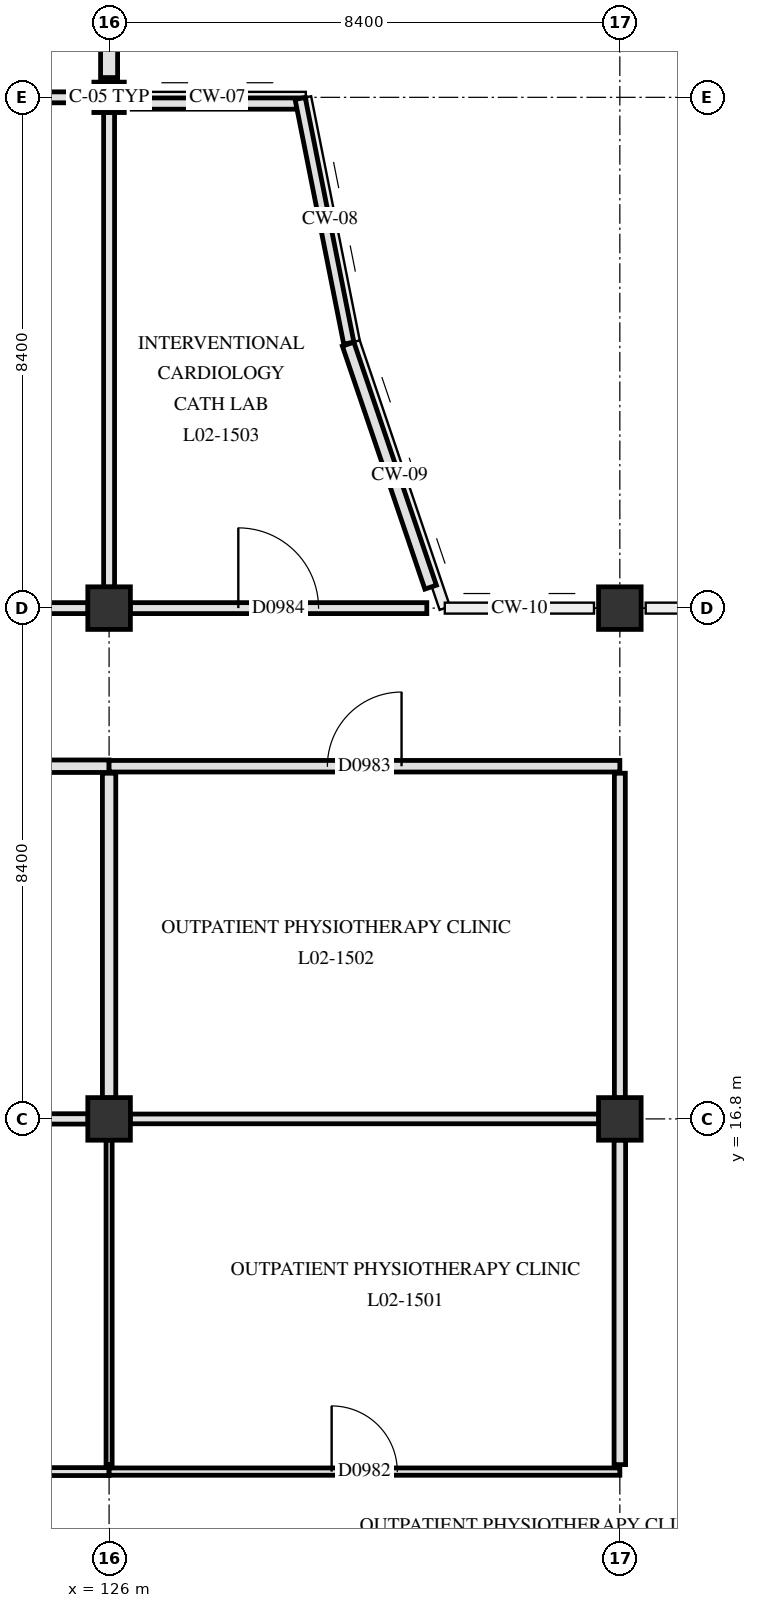
"""IFC4 building model, lengths in metres.
Left out: names, types, materials, properties, quantities, classifications, styles, units other than length and angle.
Written with IfcOpenShell. Run it as: python <this file> out.ifc"""

import sys

from ifc_helpers import new_model, si_unit, direction, frame, frame_2d, origin, origin_2d, place, context, subcontext, project, spatial, rectangle, extrude, element, fill, save


model = new_model("IFC4")
c1 = context("Model", 3, precision=1e-05, world=origin(), true_north=direction((0.0, 1.0)))
c2 = subcontext(c1, "Body", "Model", "MODEL_VIEW")
j1 = project(units=[si_unit("LENGTHUNIT", "METRE"), si_unit("PLANEANGLEUNIT", "RADIAN")], contexts=[c1])
p1 = place(None, origin())
s1 = spatial("IfcSite", under=j1, at=p1, CompositionType="ELEMENT")
p2 = place(p1, origin())
s2 = spatial("IfcBuilding", under=s1, at=p2, CompositionType="ELEMENT")
p3 = place(p2, frame((0.0, 0.0, 9.3)))
s3 = spatial("IfcBuildingStorey", under=s2, at=p3, CompositionType="ELEMENT", Elevation=9.3)
for number, where, z_axis, x_axis in (
    (1, (126.0, 16.8, 0.0), (0.0, 0.0, 1.0), (1.0, 0.0, 0.0)),
    (2, (126.0, 25.2, 0.0), (0.0, 0.0, 1.0), (1.0, 0.0, 0.0)),
):
    element("IfcColumn", number, at=place(p3, frame(where, z_axis=z_axis, x_axis=x_axis)), inside=s3, PredefinedType="COLUMN", context=c2, shape_type="SweptSolid", body=[
        extrude(rectangle(XDim=0.7, YDim=0.7, at=origin_2d()), origin(), (0.0, 0.0, 1.0), 5.1),
    ])
p4 = place(p3, frame((126.0, 33.6, 0.0), z_axis=(0.0, 0.0, 1.0), x_axis=(1.0, 0.0, 0.0)))
e3 = element("IfcColumn", 3, at=p4, inside=s3, PredefinedType="COLUMN", context=c2, shape_type="SweptSolid", body=[
    extrude(rectangle(XDim=0.5, YDim=0.5, at=origin_2d()), origin(), (0.0, 0.0, 1.0), 5.1),
])
for number, where, z_axis, x_axis in (
    (4, (134.4, 16.8, 0.0), (0.0, 0.0, 1.0), (1.0, 0.0, 0.0)),
    (5, (134.4, 25.2, 0.0), (0.0, 0.0, 1.0), (1.0, 0.0, 0.0)),
):
    element("IfcColumn", number, at=place(p3, frame(where, z_axis=z_axis, x_axis=x_axis)), inside=s3, PredefinedType="COLUMN", context=c2, shape_type="SweptSolid", body=[
        extrude(rectangle(XDim=0.7, YDim=0.7, at=origin_2d()), origin(), (0.0, 0.0, 1.0), 5.1),
    ])
p5 = place(p3, frame((126.0, 41.675, 0.0), z_axis=(0.0, 0.0, 1.0), x_axis=(0.0, -1.0, 0.0)))
e6 = element("IfcWall", 6, at=p5, inside=s3, PredefinedType="SOLIDWALL", context=c2, shape_type="SweptSolid", body=[
    extrude(rectangle(XDim=7.75, YDim=0.28, at=frame_2d((3.875, 0.0))), origin(), (0.0, 0.0, 1.0), 4.07),
])
p6 = place(p5, frame((0.988, 0.0, 0.85)))
e7 = element("IfcOpeningElement", 7, at=p6, cuts=e6, PredefinedType="OPENING", context=c2, shape_type="SweptSolid", body=[
    extrude(rectangle(XDim=1.9, YDim=1.42, at=frame_2d((0.95, 0.71))), frame((0.0, 0.15, 0.0), z_axis=(0.0, -1.0, 0.0), x_axis=(1.0, 0.0, 0.0)), (0.0, 0.0, 1.0), 0.3),
])
p7 = place(p5, frame((5.288, 0.0, 0.85)))
e8 = element("IfcOpeningElement", 8, at=p7, cuts=e6, PredefinedType="OPENING", context=c2, shape_type="SweptSolid", body=[
    extrude(rectangle(XDim=1.05, YDim=1.54, at=frame_2d((0.525, 0.77))), frame((0.0, 0.15, 0.0), z_axis=(0.0, -1.0, 0.0), x_axis=(1.0, 0.0, 0.0)), (0.0, 0.0, 1.0), 0.3),
])
p8 = place(p3, frame((126.38, 33.498, 5.08), z_axis=(0.0, 0.0, 1.0), x_axis=(1.0, 0.0, 0.0)))
e9 = element("IfcWall", 9, at=p8, inside=s3, PredefinedType="PARAPET", context=c2, shape_type="SweptSolid", body=[
    extrude(rectangle(XDim=2.855, YDim=0.185, at=frame_2d((1.428, 0.0))), origin(), (0.0, 0.0, 1.0), 1.17),
])
p9 = place(p3, frame((129.142, 33.582, 5.08), z_axis=(0.0, 0.0, 1.0), x_axis=(0.195085981744, -0.980786143727, 0.0)))
e10 = element("IfcWall", 10, at=p9, inside=s3, PredefinedType="PARAPET", context=c2, shape_type="SweptSolid", body=[
    extrude(rectangle(XDim=4.102, YDim=0.17, at=frame_2d((2.051, 0.0))), origin(), (0.0, 0.0, 1.0), 1.17),
])
p10 = place(p3, frame((129.931, 29.541, 5.08), z_axis=(0.0, 0.0, 1.0), x_axis=(0.321446404393, -0.946927773963, 0.0)))
e11 = element("IfcWall", 11, at=p10, inside=s3, PredefinedType="PARAPET", context=c2, shape_type="SweptSolid", body=[
    extrude(rectangle(XDim=4.22, YDim=0.2, at=frame_2d((2.11, 0.0))), origin(), (0.0, 0.0, 1.0), 1.17),
])
p11 = place(p3, frame((117.6, 11.0, 0.0), z_axis=(0.0, 0.0, 1.0), x_axis=(1.0, 0.0, 0.0)))
e12 = element("IfcWall", 12, at=p11, inside=s3, PredefinedType="PARTITIONING", context=c2, shape_type="SweptSolid", body=[
    extrude(rectangle(XDim=8.4, YDim=0.13, at=frame_2d((4.2, 0.0))), origin(), (0.0, 0.0, 1.0), 4.17),
])
p12 = place(p11, frame((3.675, 0.0, 0.0)))
e13 = element("IfcOpeningElement", 13, at=p12, cuts=e12, PredefinedType="OPENING", context=c2, shape_type="SweptSolid", body=[
    extrude(rectangle(XDim=1.05, YDim=2.15, at=frame_2d((0.525, 1.075))), frame((0.0, 0.075, 0.0), z_axis=(0.0, -1.0, 0.0), x_axis=(1.0, 0.0, 0.0)), (0.0, 0.0, 1.0), 0.15),
])
p13 = place(p3, frame((126.0, 11.0, 0.0), z_axis=(0.0, 0.0, 1.0), x_axis=(1.0, 0.0, 0.0)))
e14 = element("IfcWall", 14, at=p13, inside=s3, PredefinedType="PARTITIONING", context=c2, shape_type="SweptSolid", body=[
    extrude(rectangle(XDim=8.4, YDim=0.12, at=frame_2d((4.2, 0.0))), origin(), (0.0, 0.0, 1.0), 4.17),
])
p14 = place(p13, frame((3.66, 0.0, 0.0)))
e15 = element("IfcOpeningElement", 15, at=p14, cuts=e14, PredefinedType="OPENING", context=c2, shape_type="SweptSolid", body=[
    extrude(rectangle(XDim=1.08, YDim=2.12, at=frame_2d((0.54, 1.06))), frame((0.0, 0.07, 0.0), z_axis=(0.0, -1.0, 0.0), x_axis=(1.0, 0.0, 0.0)), (0.0, 0.0, 1.0), 0.14),
])
p15 = place(p3, frame((117.945, 16.8, 0.0), z_axis=(0.0, 0.0, 1.0), x_axis=(1.0, 0.0, 0.0)))
e16 = element("IfcWall", 16, at=p15, inside=s3, PredefinedType="PARTITIONING", context=c2, shape_type="SweptSolid", body=[
    extrude(rectangle(XDim=7.71, YDim=0.17, at=frame_2d((3.855, 0.0))), origin(), (0.0, 0.0, 1.0), 4.17),
])
p16 = place(p3, frame((126.345, 16.8, 0.0), z_axis=(0.0, 0.0, 1.0), x_axis=(1.0, 0.0, 0.0)))
e17 = element("IfcWall", 17, at=p16, inside=s3, PredefinedType="PARTITIONING", context=c2, shape_type="SweptSolid", body=[
    extrude(rectangle(XDim=7.71, YDim=0.16, at=frame_2d((3.855, 0.0))), origin(), (0.0, 0.0, 1.0), 4.17),
])
p17 = place(p3, frame((117.6, 22.6, 0.0), z_axis=(0.0, 0.0, 1.0), x_axis=(1.0, 0.0, 0.0)))
e18 = element("IfcWall", 18, at=p17, inside=s3, PredefinedType="PARTITIONING", context=c2, shape_type="SweptSolid", body=[
    extrude(rectangle(XDim=8.4, YDim=0.205, at=frame_2d((4.2, 0.0))), origin(), (0.0, 0.0, 1.0), 4.17),
])
p18 = place(p17, frame((3.725, 0.0, 0.0)))
e19 = element("IfcOpeningElement", 19, at=p18, cuts=e18, PredefinedType="OPENING", context=c2, shape_type="SweptSolid", body=[
    extrude(rectangle(XDim=0.95, YDim=2.1, at=frame_2d((0.475, 1.05))), frame((0.0, 0.113, 0.0), z_axis=(0.0, -1.0, 0.0), x_axis=(1.0, 0.0, 0.0)), (0.0, 0.0, 1.0), 0.225),
])
p19 = place(p3, frame((126.0, 22.6, 0.0), z_axis=(0.0, 0.0, 1.0), x_axis=(1.0, 0.0, 0.0)))
e20 = element("IfcWall", 20, at=p19, inside=s3, PredefinedType="PARTITIONING", context=c2, shape_type="SweptSolid", body=[
    extrude(rectangle(XDim=8.4, YDim=0.19, at=frame_2d((4.2, 0.0))), origin(), (0.0, 0.0, 1.0), 4.17),
])
p20 = place(p19, frame((3.59, 0.0, 0.0)))
e21 = element("IfcOpeningElement", 21, at=p20, cuts=e20, PredefinedType="OPENING", context=c2, shape_type="SweptSolid", body=[
    extrude(rectangle(XDim=1.22, YDim=2.18, at=frame_2d((0.61, 1.09))), frame((0.0, 0.105, 0.0), z_axis=(0.0, -1.0, 0.0), x_axis=(1.0, 0.0, 0.0)), (0.0, 0.0, 1.0), 0.21),
])
p21 = place(p3, frame((117.945, 25.2, 0.0), z_axis=(0.0, 0.0, 1.0), x_axis=(1.0, 0.0, 0.0)))
e22 = element("IfcWall", 22, at=p21, inside=s3, PredefinedType="PARTITIONING", context=c2, shape_type="SweptSolid", body=[
    extrude(rectangle(XDim=7.71, YDim=0.18, at=frame_2d((3.855, 0.0))), origin(), (0.0, 0.0, 1.0), 4.17),
])
p22 = place(p21, frame((3.305, 0.0, 0.0)))
e23 = element("IfcOpeningElement", 23, at=p22, cuts=e22, PredefinedType="OPENING", context=c2, shape_type="SweptSolid", body=[
    extrude(rectangle(XDim=1.1, YDim=2.15, at=frame_2d((0.55, 1.075))), frame((0.0, 0.1, 0.0), z_axis=(0.0, -1.0, 0.0), x_axis=(1.0, 0.0, 0.0)), (0.0, 0.0, 1.0), 0.2),
])
p23 = place(p3, frame((126.345, 25.2, 0.0), z_axis=(0.0, 0.0, 1.0), x_axis=(1.0, 0.0, 0.0)))
e24 = element("IfcWall", 24, at=p23, inside=s3, PredefinedType="PARTITIONING", context=c2, shape_type="SweptSolid", body=[
    extrude(rectangle(XDim=4.88, YDim=0.18, at=frame_2d((2.44, 0.0))), origin(), (0.0, 0.0, 1.0), 4.17),
])
p24 = place(p23, frame((1.78, 0.0, 0.0)))
e25 = element("IfcOpeningElement", 25, at=p24, cuts=e24, PredefinedType="OPENING", context=c2, shape_type="SweptSolid", body=[
    extrude(rectangle(XDim=1.32, YDim=2.18, at=frame_2d((0.66, 1.09))), frame((0.0, 0.1, 0.0), z_axis=(0.0, -1.0, 0.0), x_axis=(1.0, 0.0, 0.0)), (0.0, 0.0, 1.0), 0.2),
])
p25 = place(p3, frame((117.945, 33.6, 0.0), z_axis=(0.0, 0.0, 1.0), x_axis=(1.0, 0.0, 0.0)))
e26 = element("IfcWall", 26, at=p25, inside=s3, PredefinedType="PARTITIONING", context=c2, shape_type="SweptSolid", body=[
    extrude(rectangle(XDim=7.81, YDim=0.18, at=frame_2d((3.905, 0.0))), origin(), (0.0, 0.0, 1.0), 4.17),
])
p26 = place(p3, frame((126.0, 11.115, 0.0), z_axis=(0.0, 0.0, 1.0), x_axis=(0.0, 1.0, 0.0)))
e27 = element("IfcWall", 27, at=p26, inside=s3, PredefinedType="PARTITIONING", context=c2, shape_type="SweptSolid", body=[
    extrude(rectangle(XDim=5.34, YDim=0.1, at=frame_2d((2.67, 0.0))), origin(), (0.0, 0.0, 1.0), 4.17),
])
p27 = place(p3, frame((126.0, 17.145, 0.0), z_axis=(0.0, 0.0, 1.0), x_axis=(0.0, 1.0, 0.0)))
e28 = element("IfcWall", 28, at=p27, inside=s3, PredefinedType="PARTITIONING", context=c2, shape_type="SweptSolid", body=[
    extrude(rectangle(XDim=5.34, YDim=0.22, at=frame_2d((2.67, 0.0))), origin(), (0.0, 0.0, 1.0), 4.17),
])
p28 = place(p3, frame((126.0, 25.545, 0.0), z_axis=(0.0, 0.0, 1.0), x_axis=(0.0, 1.0, 0.0)))
e29 = element("IfcWall", 29, at=p28, inside=s3, PredefinedType="PARTITIONING", context=c2, shape_type="SweptSolid", body=[
    extrude(rectangle(XDim=7.81, YDim=0.18, at=frame_2d((3.905, 0.0))), origin(), (0.0, 0.0, 1.0), 4.17),
])
p29 = place(p3, frame((134.4, 11.115, 0.0), z_axis=(0.0, 0.0, 1.0), x_axis=(0.0, 1.0, 0.0)))
e30 = element("IfcWall", 30, at=p29, inside=s3, PredefinedType="PARTITIONING", context=c2, shape_type="SweptSolid", body=[
    extrude(rectangle(XDim=5.34, YDim=0.19, at=frame_2d((2.67, 0.0))), origin(), (0.0, 0.0, 1.0), 4.17),
])
p30 = place(p3, frame((134.4, 17.145, 0.0), z_axis=(0.0, 0.0, 1.0), x_axis=(0.0, 1.0, 0.0)))
e31 = element("IfcWall", 31, at=p30, inside=s3, PredefinedType="PARTITIONING", context=c2, shape_type="SweptSolid", body=[
    extrude(rectangle(XDim=5.34, YDim=0.18, at=frame_2d((2.67, 0.0))), origin(), (0.0, 0.0, 1.0), 4.17),
])
p31 = place(p14, origin())
e32 = element("IfcDoor", 32, at=p31, inside=s3, OperationType="SINGLE_SWING_LEFT", PredefinedType="DOOR", context=c2, shape_type="SweptSolid", body=[
    extrude(rectangle(XDim=1.08, YDim=2.12, at=frame_2d((0.54, 1.06))), frame((0.0, 0.025, 0.0), z_axis=(0.0, -1.0, 0.0), x_axis=(1.0, 0.0, 0.0)), (0.0, 0.0, 1.0), 0.05),
])
fill(e15, e32)
p32 = place(p20, origin())
e33 = element("IfcDoor", 33, at=p32, inside=s3, OperationType="SINGLE_SWING_RIGHT", PredefinedType="DOOR", context=c2, shape_type="SweptSolid", body=[
    extrude(rectangle(XDim=1.22, YDim=2.18, at=frame_2d((0.61, 1.09))), frame((0.0, 0.025, 0.0), z_axis=(0.0, -1.0, 0.0), x_axis=(1.0, 0.0, 0.0)), (0.0, 0.0, 1.0), 0.05),
])
fill(e21, e33)
p33 = place(p24, origin())
e34 = element("IfcDoor", 34, at=p33, inside=s3, OperationType="SINGLE_SWING_LEFT", PredefinedType="DOOR", context=c2, shape_type="SweptSolid", body=[
    extrude(rectangle(XDim=1.32, YDim=2.18, at=frame_2d((0.66, 1.09))), frame((0.0, 0.025, 0.0), z_axis=(0.0, -1.0, 0.0), x_axis=(1.0, 0.0, 0.0)), (0.0, 0.0, 1.0), 0.05),
])
fill(e25, e34)
save(model, sys.argv[1])
